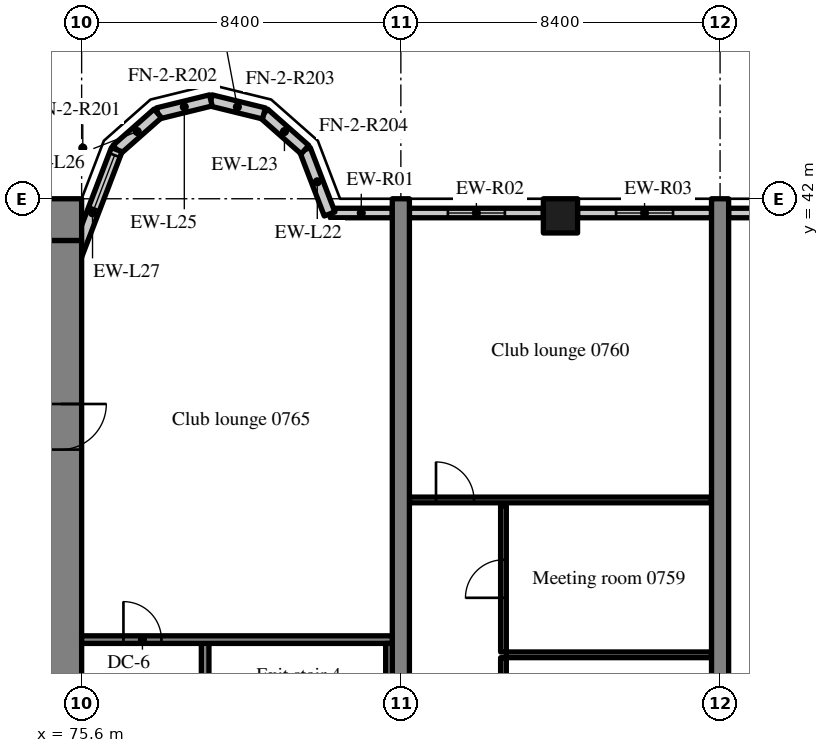
"""IFC4 building model, lengths in metres.
Left out: names, types, materials, properties, quantities, classifications, styles, units other than length and angle.
Written with IfcOpenShell. Run it as: python <this file> out.ifc"""

import sys

from ifc_helpers import new_model, si_unit, direction, frame, frame_2d, origin, origin_2d, place, context, subcontext, project, spatial, rectangle, extrude, source, transform, mapped, element, fill, save


model = new_model("IFC4")
c1 = context("Model", 3, precision=1e-05, world=origin(), true_north=direction((0.0, 1.0)))
c2 = subcontext(c1, "Body", "Model", "MODEL_VIEW")
j1 = project(units=[si_unit("LENGTHUNIT", "METRE"), si_unit("PLANEANGLEUNIT", "RADIAN")], contexts=[c1])
p1 = place(None, origin())
s1 = spatial("IfcSite", under=j1, at=p1, CompositionType="ELEMENT")
p2 = place(p1, origin())
s2 = spatial("IfcBuilding", under=s1, at=p2, CompositionType="ELEMENT")
p3 = place(p2, frame((0.0, 0.0, 35.4)))
s3 = spatial("IfcBuildingStorey", under=s2, at=p3, CompositionType="ELEMENT", Elevation=35.4)
m1 = source(origin(), c2, "Body", "SweptSolid", [
    extrude(rectangle(XDim=50.4, YDim=1.1, at=frame_2d((25.2, 0.0))), origin(), (0.0, 0.0, 1.0), 3.52),
])
p4 = place(p3, frame((25.2, 41.45, 0.0), z_axis=(0.0, 0.0, 1.0), x_axis=(1.0, 0.0, 0.0)))
e1 = element("IfcWall", 1, at=p4, inside=s3, PredefinedType="SHEAR", context=c2, shape_type="MappedRepresentation", body=[
    mapped(m1, transform((0.0, 0.0, 0.0), scale=1.0)),
])
m2 = source(origin(), c2, "Body", "SweptSolid", [
    extrude(rectangle(XDim=17.8, YDim=1.1, at=frame_2d((8.9, 0.0))), origin(), (0.0, 0.0, 1.0), 3.52),
])
p5 = place(p3, frame((75.05, 23.1, 0.0), z_axis=(0.0, 0.0, 1.0), x_axis=(0.0, 1.0, 0.0)))
e2 = element("IfcWall", 2, at=p5, inside=s3, PredefinedType="SHEAR", context=c2, shape_type="MappedRepresentation", body=[
    mapped(m2, transform((0.0, 0.0, 0.0), scale=1.0)),
])
m3 = source(origin(), c2, "Body", "SweptSolid", [
    extrude(rectangle(XDim=1.2, YDim=2.1, at=frame_2d((0.6, 1.05))), frame((0.0, 0.56, 0.0), z_axis=(0.0, -1.0, 0.0), x_axis=(1.0, 0.0, 0.0)), (0.0, 0.0, 1.0), 1.12),
])
p6 = place(p5, frame((12.3, 0.0, 0.0)))
e3 = element("IfcOpeningElement", 3, at=p6, cuts=e2, PredefinedType="OPENING", context=c2, shape_type="MappedRepresentation", body=[
    mapped(m3, transform((0.0, 0.0, 0.0), scale=1.0)),
])
m4 = source(origin(), c2, "Body", "SweptSolid", [
    extrude(rectangle(XDim=20.0, YDim=0.45, at=frame_2d((10.0, 0.0))), origin(), (0.0, 0.0, 1.0), 3.52),
])
for number, where, z_axis, x_axis in (
    (4, (84.0, 22.0, 0.0), (0.0, 0.0, 1.0), (0.0, 1.0, 0.0)),
    (5, (92.4, 22.0, 0.0), (0.0, 0.0, 1.0), (0.0, 1.0, 0.0)),
):
    element("IfcWall", number, at=place(p3, frame(where, z_axis=z_axis, x_axis=x_axis)), inside=s3, PredefinedType="SHEAR", context=c2, shape_type="MappedRepresentation", body=[
        mapped(m4, transform((0.0, 0.0, 0.0), scale=1.0)),
    ])
m5 = source(origin(), c2, "Body", "SweptSolid", [
    extrude(rectangle(XDim=0.9, YDim=0.9, at=origin_2d()), origin(), (0.0, 0.0, 1.0), 3.52),
])
p7 = place(p3, frame((88.2, 41.55, 0.0), z_axis=(0.0, 0.0, 1.0), x_axis=(1.0, 0.0, 0.0)))
e6 = element("IfcColumn", 6, at=p7, inside=s3, PredefinedType="COLUMN", context=c2, shape_type="MappedRepresentation", body=[
    mapped(m5, transform((0.0, 0.0, 0.0), scale=1.0)),
])
m6 = source(origin(), c2, "Body", "SweptSolid", [
    extrude(rectangle(XDim=1.633, YDim=0.25, at=frame_2d((0.816, 0.0))), origin(), (0.0, 0.0, 1.0), 2.77),
])
p8 = place(p3, frame((83.775, 41.625, 0.0), z_axis=(0.0, 0.0, 1.0), x_axis=(-1.0, 0.0, 0.0)))
e7 = element("IfcWall", 7, at=p8, inside=s3, PredefinedType="SOLIDWALL", context=c2, shape_type="MappedRepresentation", body=[
    mapped(m6, transform((0.0, 0.0, 0.0), scale=1.0)),
])
m7 = source(origin(), c2, "Body", "SweptSolid", [
    extrude(rectangle(XDim=3.525, YDim=0.25, at=frame_2d((1.762, 0.0))), origin(), (0.0, 0.0, 1.0), 2.77),
])
p9 = place(p3, frame((87.75, 41.625, 0.0), z_axis=(0.0, 0.0, 1.0), x_axis=(-1.0, 0.0, 0.0)))
e8 = element("IfcWall", 8, at=p9, inside=s3, PredefinedType="SOLIDWALL", context=c2, shape_type="MappedRepresentation", body=[
    mapped(m7, transform((0.0, 0.0, 0.0), scale=1.0)),
])
m8 = source(origin(), c2, "Body", "SweptSolid", [
    extrude(rectangle(XDim=1.5, YDim=1.5, at=frame_2d((0.75, 0.75))), frame((0.0, 0.135, 0.0), z_axis=(0.0, -1.0, 0.0), x_axis=(1.0, 0.0, 0.0)), (0.0, 0.0, 1.0), 0.27),
])
p10 = place(p9, frame((1.012, 0.0, 0.9)))
e9 = element("IfcOpeningElement", 9, at=p10, cuts=e8, PredefinedType="OPENING", context=c2, shape_type="MappedRepresentation", body=[
    mapped(m8, transform((0.0, 0.0, 0.0), scale=1.0)),
])
m9 = source(origin(), c2, "Body", "SweptSolid", [
    extrude(rectangle(XDim=3.525, YDim=0.25, at=frame_2d((1.763, 0.0))), origin(), (0.0, 0.0, 1.0), 2.77),
])
p11 = place(p3, frame((92.175, 41.625, 0.0), z_axis=(0.0, 0.0, 1.0), x_axis=(-1.0, 0.0, 0.0)))
e10 = element("IfcWall", 10, at=p11, inside=s3, PredefinedType="SOLIDWALL", context=c2, shape_type="MappedRepresentation", body=[
    mapped(m9, transform((0.0, 0.0, 0.0), scale=1.0)),
])
p12 = place(p11, frame((1.012, 0.0, 0.9)))
e11 = element("IfcOpeningElement", 11, at=p12, cuts=e10, PredefinedType="OPENING", context=c2, shape_type="MappedRepresentation", body=[
    mapped(m8, transform((0.0, 0.0, 0.0), scale=1.0)),
])
m10 = source(origin(), c2, "Body", "SweptSolid", [
    extrude(rectangle(XDim=4.02, YDim=0.25, at=frame_2d((2.01, 0.0))), origin(), (0.0, 0.0, 1.0), 2.77),
])
p13 = place(p3, frame((96.645, 41.625, 0.0), z_axis=(0.0, 0.0, 1.0), x_axis=(-1.0, 0.0, 0.0)))
e12 = element("IfcWall", 12, at=p13, inside=s3, PredefinedType="SOLIDWALL", context=c2, shape_type="MappedRepresentation", body=[
    mapped(m10, transform((0.0, 0.0, 0.0), scale=1.0)),
])
p14 = place(p13, frame((1.26, 0.0, 0.9)))
e13 = element("IfcOpeningElement", 13, at=p14, cuts=e12, PredefinedType="OPENING", context=c2, shape_type="MappedRepresentation", body=[
    mapped(m8, transform((0.0, 0.0, 0.0), scale=1.0)),
])
m11 = source(origin(), c2, "Body", "SweptSolid", [
    extrude(rectangle(XDim=1.812, YDim=0.3, at=frame_2d((0.906, 0.0))), origin(), (0.0, 0.0, 1.0), 3.52),
])
p15 = place(p3, frame((82.125, 41.6, 0.0), z_axis=(0.0, 0.0, 1.0), x_axis=(-0.357877270961, 0.93376863244, 0.0)))
e14 = element("IfcWall", 14, at=p15, inside=s3, PredefinedType="SOLIDWALL", context=c2, shape_type="MappedRepresentation", body=[
    mapped(m11, transform((0.0, 0.0, 0.0), scale=1.0)),
])
m12 = source(origin(), c2, "Body", "SweptSolid", [
    extrude(rectangle(XDim=1.44, YDim=0.3, at=frame_2d((0.72, 0.0))), origin(), (0.0, 0.0, 1.0), 3.52),
])
p16 = place(p3, frame((81.477, 43.292, 0.0), z_axis=(0.0, 0.0, 1.0), x_axis=(-0.74957555648, 0.661918790432, 0.0)))
e15 = element("IfcWall", 15, at=p16, inside=s3, PredefinedType="SOLIDWALL", context=c2, shape_type="MappedRepresentation", body=[
    mapped(m12, transform((0.0, 0.0, 0.0), scale=1.0)),
])
m13 = source(origin(), c2, "Body", "SweptSolid", [
    extrude(rectangle(XDim=1.439, YDim=0.3, at=frame_2d((0.719, 0.0))), origin(), (0.0, 0.0, 1.0), 3.52),
])
for number, where, z_axis, x_axis in (
    (16, (80.397, 44.245, 0.0), (0.0, 0.0, 1.0), (-0.971, 0.238, 0.0)),
    (17, (79.0, 44.588, 0.0), (0.0, 0.0, 1.0), (-0.971, -0.238, 0.0)),
):
    element("IfcWall", number, at=place(p3, frame(where, z_axis=z_axis, x_axis=x_axis)), inside=s3, PredefinedType="SOLIDWALL", context=c2, shape_type="MappedRepresentation", body=[
        mapped(m13, transform((0.0, 0.0, 0.0), scale=1.0)),
    ])
p17 = place(p3, frame((77.603, 44.245, 0.0), z_axis=(0.0, 0.0, 1.0), x_axis=(-0.74957555648, -0.661918790432, 0.0)))
e18 = element("IfcWall", 18, at=p17, inside=s3, PredefinedType="SOLIDWALL", context=c2, shape_type="MappedRepresentation", body=[
    mapped(m12, transform((0.0, 0.0, 0.0), scale=1.0)),
])
m14 = source(origin(), c2, "Body", "SweptSolid", [
    extrude(rectangle(XDim=3.559, YDim=0.3, at=frame_2d((1.78, 0.0))), origin(), (0.0, 0.0, 1.0), 3.52),
])
p18 = place(p3, frame((76.523, 43.292, 0.0), z_axis=(0.0, 0.0, 1.0), x_axis=(-0.35779745313, -0.933799219604, 0.0)))
e19 = element("IfcWall", 19, at=p18, inside=s3, PredefinedType="SOLIDWALL", context=c2, shape_type="MappedRepresentation", body=[
    mapped(m14, transform((0.0, 0.0, 0.0), scale=1.0)),
])
m15 = source(origin(), c2, "Body", "SweptSolid", [
    extrude(rectangle(XDim=1.5, YDim=2.0, at=frame_2d((0.75, 1.0))), frame((0.0, 0.16, 0.0), z_axis=(0.0, -1.0, 0.0), x_axis=(1.0, 0.0, 0.0)), (0.0, 0.0, 1.0), 0.32),
])
p19 = place(p18, frame((0.156, 0.0, 0.9)))
e20 = element("IfcOpeningElement", 20, at=p19, cuts=e19, PredefinedType="OPENING", context=c2, shape_type="MappedRepresentation", body=[
    mapped(m15, transform((0.0, 0.0, 0.0), scale=1.0)),
])
m16 = source(origin(), c2, "Body", "SweptSolid", [
    extrude(rectangle(XDim=8.3, YDim=0.2, at=frame_2d((4.15, 0.0))), origin(), (0.0, 0.0, 1.0), 3.52),
])
p20 = place(p3, frame((78.85, 22.1, 0.0), z_axis=(0.0, 0.0, 1.0), x_axis=(0.0, 1.0, 0.0)))
e21 = element("IfcWall", 21, at=p20, inside=s3, PredefinedType="SOLIDWALL", context=c2, shape_type="MappedRepresentation", body=[
    mapped(m16, transform((0.0, 0.0, 0.0), scale=1.0)),
])
m17 = source(origin(), c2, "Body", "SweptSolid", [
    extrude(rectangle(XDim=1.2, YDim=2.1, at=frame_2d((0.6, 1.05))), frame((0.0, 0.11, 0.0), z_axis=(0.0, -1.0, 0.0), x_axis=(1.0, 0.0, 0.0)), (0.0, 0.0, 1.0), 0.22),
])
p21 = place(p20, frame((0.6, 0.0, 0.0)))
e22 = element("IfcOpeningElement", 22, at=p21, cuts=e21, PredefinedType="OPENING", context=c2, shape_type="MappedRepresentation", body=[
    mapped(m17, transform((0.0, 0.0, 0.0), scale=1.0)),
])
m18 = source(origin(), c2, "Body", "SweptSolid", [
    extrude(rectangle(XDim=8.175, YDim=0.2, at=frame_2d((4.087, 0.0))), origin(), (0.0, 0.0, 1.0), 3.52),
])
p22 = place(p3, frame((83.775, 30.4, 0.0), z_axis=(0.0, 0.0, 1.0), x_axis=(-1.0, 0.0, 0.0)))
e23 = element("IfcWall", 23, at=p22, inside=s3, PredefinedType="SOLIDWALL", context=c2, shape_type="MappedRepresentation", body=[
    mapped(m18, transform((0.0, 0.0, 0.0), scale=1.0)),
])
m19 = source(origin(), c2, "Body", "SweptSolid", [
    extrude(rectangle(XDim=1.0, YDim=2.1, at=frame_2d((0.5, 1.05))), frame((0.0, 0.11, 0.0), z_axis=(0.0, -1.0, 0.0), x_axis=(1.0, 0.0, 0.0)), (0.0, 0.0, 1.0), 0.22),
])
p23 = place(p22, frame((6.075, 0.0, 0.0)))
e24 = element("IfcOpeningElement", 24, at=p23, cuts=e23, PredefinedType="OPENING", context=c2, shape_type="MappedRepresentation", body=[
    mapped(m19, transform((0.0, 0.0, 0.0), scale=1.0)),
])
m20 = source(origin(), c2, "Body", "SweptSolid", [
    extrude(rectangle(XDim=8.1, YDim=0.175, at=frame_2d((4.05, 0.0))), origin(), (0.0, 0.0, 1.0), 3.52),
])
p24 = place(p3, frame((83.688, 22.2, 0.0), z_axis=(0.0, 0.0, 1.0), x_axis=(0.0, 1.0, 0.0)))
e25 = element("IfcWall", 25, at=p24, inside=s3, PredefinedType="SOLIDWALL", context=c2, shape_type="MappedRepresentation", body=[
    mapped(m20, transform((0.0, 0.0, 0.0), scale=1.0)),
])
m21 = source(origin(), c2, "Body", "SweptSolid", [
    extrude(rectangle(XDim=3.25, YDim=0.15, at=frame_2d((1.625, 0.0))), origin(), (0.0, 0.0, 1.0), 3.52),
])
p25 = place(p3, frame((86.7, 26.675, 0.0), z_axis=(0.0, 0.0, 1.0), x_axis=(0.0, 1.0, 0.0)))
e26 = element("IfcWall", 26, at=p25, inside=s3, PredefinedType="PARTITIONING", context=c2, shape_type="MappedRepresentation", body=[
    mapped(m21, transform((0.0, 0.0, 0.0), scale=1.0)),
])
m22 = source(origin(), c2, "Body", "SweptSolid", [
    extrude(rectangle(XDim=1.0, YDim=2.1, at=frame_2d((0.5, 1.05))), frame((0.0, 0.085, 0.0), z_axis=(0.0, -1.0, 0.0), x_axis=(1.0, 0.0, 0.0)), (0.0, 0.0, 1.0), 0.17),
])
p26 = place(p25, frame((1.125, 0.0, 0.0)))
e27 = element("IfcOpeningElement", 27, at=p26, cuts=e26, PredefinedType="OPENING", context=c2, shape_type="MappedRepresentation", body=[
    mapped(m22, transform((0.0, 0.0, 0.0), scale=1.0)),
])
m23 = source(origin(), c2, "Body", "SweptSolid", [
    extrude(rectangle(XDim=5.4, YDim=0.15, at=frame_2d((2.7, 0.0))), origin(), (0.0, 0.0, 1.0), 3.52),
])
p27 = place(p3, frame((86.775, 30.0, 0.0), z_axis=(0.0, 0.0, 1.0), x_axis=(1.0, 0.0, 0.0)))
e28 = element("IfcWall", 28, at=p27, inside=s3, PredefinedType="PARTITIONING", context=c2, shape_type="MappedRepresentation", body=[
    mapped(m23, transform((0.0, 0.0, 0.0), scale=1.0)),
])
m24 = source(origin(), c2, "Body", "SweptSolid", [
    extrude(rectangle(XDim=3.85, YDim=0.15, at=frame_2d((1.925, 0.0))), origin(), (0.0, 0.0, 1.0), 3.52),
])
p28 = place(p3, frame((86.7, 30.075, 0.0), z_axis=(0.0, 0.0, 1.0), x_axis=(0.0, 1.0, 0.0)))
e29 = element("IfcWall", 29, at=p28, inside=s3, PredefinedType="PARTITIONING", context=c2, shape_type="MappedRepresentation", body=[
    mapped(m24, transform((0.0, 0.0, 0.0), scale=1.0)),
])
p29 = place(p28, frame((1.425, 0.0, 0.0)))
e30 = element("IfcOpeningElement", 30, at=p29, cuts=e29, PredefinedType="OPENING", context=c2, shape_type="MappedRepresentation", body=[
    mapped(m22, transform((0.0, 0.0, 0.0), scale=1.0)),
])
m25 = source(origin(), c2, "Body", "SweptSolid", [
    extrude(rectangle(XDim=7.95, YDim=0.15, at=frame_2d((3.975, 0.0))), origin(), (0.0, 0.0, 1.0), 3.52),
])
p30 = place(p3, frame((84.225, 34.075, 0.0), z_axis=(0.0, 0.0, 1.0), x_axis=(1.0, 0.0, 0.0)))
e31 = element("IfcWall", 31, at=p30, inside=s3, PredefinedType="PARTITIONING", context=c2, shape_type="MappedRepresentation", body=[
    mapped(m25, transform((0.0, 0.0, 0.0), scale=1.0)),
])
p31 = place(p30, frame((0.7, 0.0, 0.0)))
e32 = element("IfcOpeningElement", 32, at=p31, cuts=e31, PredefinedType="OPENING", context=c2, shape_type="MappedRepresentation", body=[
    mapped(m22, transform((0.0, 0.0, 0.0), scale=1.0)),
])
m26 = source(origin(), c2, "Body", "SweptSolid", [
    extrude(rectangle(XDim=1.5, YDim=1.5, at=frame_2d((0.75, 0.75))), frame((0.0, 0.03, 0.0), z_axis=(0.0, -1.0, 0.0), x_axis=(1.0, 0.0, 0.0)), (0.0, 0.0, 1.0), 0.06),
])
p32 = place(p10, origin())
e33 = element("IfcWindow", 33, at=p32, inside=s3, PartitioningType="SINGLE_PANEL", PredefinedType="WINDOW", context=c2, shape_type="MappedRepresentation", body=[
    mapped(m26, transform((0.0, 0.0, 0.0), scale=1.0)),
])
fill(e9, e33)
p33 = place(p12, origin())
e34 = element("IfcWindow", 34, at=p33, inside=s3, PartitioningType="SINGLE_PANEL", PredefinedType="WINDOW", context=c2, shape_type="MappedRepresentation", body=[
    mapped(m26, transform((0.0, 0.0, 0.0), scale=1.0)),
])
fill(e11, e34)
m27 = source(origin(), c2, "Body", "SweptSolid", [
    extrude(rectangle(XDim=1.5, YDim=2.0, at=frame_2d((0.75, 1.0))), frame((0.0, 0.03, 0.0), z_axis=(0.0, -1.0, 0.0), x_axis=(1.0, 0.0, 0.0)), (0.0, 0.0, 1.0), 0.06),
])
p34 = place(p19, origin())
e35 = element("IfcWindow", 35, at=p34, inside=s3, PartitioningType="SINGLE_PANEL", PredefinedType="WINDOW", context=c2, shape_type="MappedRepresentation", body=[
    mapped(m27, transform((0.0, 0.0, 0.0), scale=1.0)),
])
fill(e20, e35)
m28 = source(origin(), c2, "Body", "SweptSolid", [
    extrude(rectangle(XDim=1.2, YDim=2.1, at=frame_2d((0.6, 1.05))), frame((0.0, 0.025, 0.0), z_axis=(0.0, -1.0, 0.0), x_axis=(1.0, 0.0, 0.0)), (0.0, 0.0, 1.0), 0.05),
])
p35 = place(p6, origin())
e36 = element("IfcDoor", 36, at=p35, inside=s3, OperationType="SINGLE_SWING_RIGHT", PredefinedType="DOOR", context=c2, shape_type="MappedRepresentation", body=[
    mapped(m28, transform((0.0, 0.0, 0.0), scale=1.0)),
])
fill(e3, e36)
m29 = source(origin(), c2, "Body", "SweptSolid", [
    extrude(rectangle(XDim=1.0, YDim=2.1, at=frame_2d((0.5, 1.05))), frame((0.0, 0.025, 0.0), z_axis=(0.0, -1.0, 0.0), x_axis=(1.0, 0.0, 0.0)), (0.0, 0.0, 1.0), 0.05),
])
p36 = place(p23, origin())
e37 = element("IfcDoor", 37, at=p36, inside=s3, OperationType="SINGLE_SWING_RIGHT", PredefinedType="DOOR", context=c2, shape_type="MappedRepresentation", body=[
    mapped(m29, transform((0.0, 0.0, 0.0), scale=1.0)),
])
fill(e24, e37)
p37 = place(p29, origin())
e38 = element("IfcDoor", 38, at=p37, inside=s3, OperationType="SINGLE_SWING_LEFT", PredefinedType="DOOR", context=c2, shape_type="MappedRepresentation", body=[
    mapped(m29, transform((0.0, 0.0, 0.0), scale=1.0)),
])
fill(e30, e38)
p38 = place(p31, origin())
e39 = element("IfcDoor", 39, at=p38, inside=s3, OperationType="SINGLE_SWING_LEFT", PredefinedType="DOOR", context=c2, shape_type="MappedRepresentation", body=[
    mapped(m29, transform((0.0, 0.0, 0.0), scale=1.0)),
])
fill(e32, e39)
save(model, sys.argv[1])
